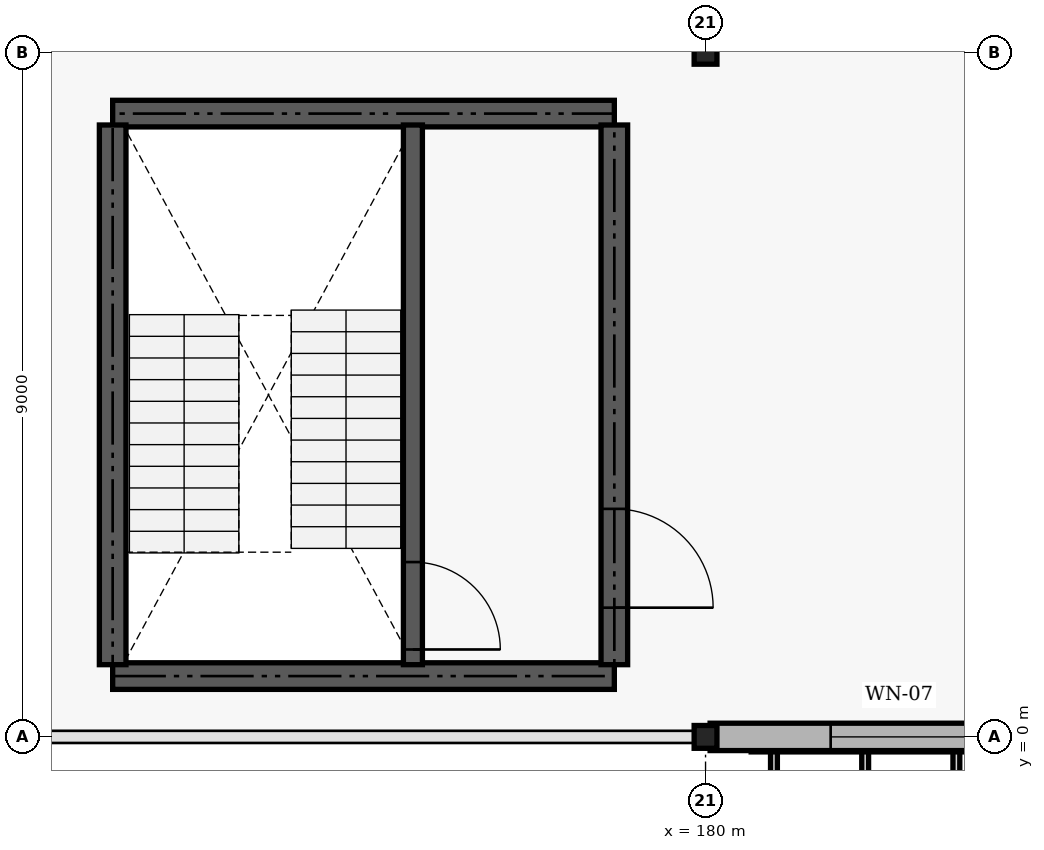
"""IFC4 building model, lengths in metres.
Left out: names, types, materials, properties, quantities, classifications, styles, units other than length and angle.
Written with IfcOpenShell. Run it as: python <this file> out.ifc"""

import sys

from ifc_helpers import new_model, si_unit, direction, frame, frame_2d, origin, origin_2d, place, context, subcontext, project, spatial, rectangle, i_section, extrude, element, fill, save


model = new_model("IFC4")
c1 = context("Model", 3, precision=1e-05, world=origin(), true_north=direction((0.0, 1.0)))
c2 = subcontext(c1, "Body", "Model", "MODEL_VIEW")
j1 = project(units=[si_unit("LENGTHUNIT", "METRE"), si_unit("PLANEANGLEUNIT", "RADIAN")], contexts=[c1])
p1 = place(None, origin())
s1 = spatial("IfcSite", under=j1, at=p1, CompositionType="ELEMENT")
p2 = place(p1, origin())
s2 = spatial("IfcBuilding", under=s1, at=p2, CompositionType="ELEMENT")
p3 = place(p2, frame((0.0, 0.0, 9.6)))
s3 = spatial("IfcBuildingStorey", under=s2, at=p3, CompositionType="ELEMENT", Elevation=9.6)
for number, where, z_axis, x_axis in (
    (1, (180.0, 0.0, 0.0), (0.0, 0.0, 1.0), (1.0, 0.0, 0.0)),
    (2, (180.0, 9.0, 0.0), (0.0, 0.0, 1.0), (1.0, 0.0, 0.0)),
):
    element("IfcColumn", number, at=place(p3, frame(where, z_axis=z_axis, x_axis=x_axis)), inside=s3, PredefinedType="COLUMN", context=c2, shape_type="SweptSolid", body=[
        extrude(i_section(OverallWidth=0.3, OverallDepth=0.3, WebThickness=0.011, FlangeThickness=0.019, FilletRadius=0.027, at=origin_2d()), origin(), (0.0, 0.0, 1.0), 3.9),
    ])
p4 = place(p3, frame((180.06, 0.0, 0.0), z_axis=(0.0, 0.0, 1.0), x_axis=(1.0, 0.0, 0.0)))
e3 = element("IfcWall", 3, at=p4, inside=s3, PredefinedType="SOLIDWALL", context=c2, shape_type="SweptSolid", body=[
    extrude(rectangle(XDim=8.88, YDim=0.36, at=frame_2d((4.44, 0.0))), origin(), (0.0, 0.0, 1.0), 3.25),
])
p5 = place(p4, frame((1.586, 0.0, 0.9)))
e4 = element("IfcOpeningElement", 4, at=p5, cuts=e3, PredefinedType="OPENING", context=c2, shape_type="SweptSolid", body=[
    extrude(rectangle(XDim=1.8, YDim=1.8, at=frame_2d((0.9, 0.9))), frame((0.0, 0.19, 0.0), z_axis=(0.0, -1.0, 0.0), x_axis=(1.0, 0.0, 0.0)), (0.0, 0.0, 1.0), 0.38),
])
p6 = place(p4, frame((5.494, 0.0, 0.9)))
e5 = element("IfcOpeningElement", 5, at=p6, cuts=e3, PredefinedType="OPENING", context=c2, shape_type="SweptSolid", body=[
    extrude(rectangle(XDim=1.8, YDim=1.8, at=frame_2d((0.9, 0.9))), frame((0.0, 0.19, 0.0), z_axis=(0.0, -1.0, 0.0), x_axis=(1.0, 0.0, 0.0)), (0.0, 0.0, 1.0), 0.38),
])
for number, where, z_axis, x_axis in (
    (6, (172.2, 0.8, 0.0), (0.0, 0.0, 1.0), (1.0, 0.0, 0.0)),
    (7, (172.2, 8.2, 0.0), (0.0, 0.0, 1.0), (1.0, 0.0, 0.0)),
):
    element("IfcWall", number, at=place(p3, frame(where, z_axis=z_axis, x_axis=x_axis)), inside=s3, PredefinedType="SHEAR", context=c2, shape_type="SweptSolid", body=[
        extrude(rectangle(XDim=6.6, YDim=0.35, at=frame_2d((3.3, 0.0))), origin(), (0.0, 0.0, 1.0), 3.9),
    ])
p7 = place(p3, frame((172.2, 0.95, 0.0), z_axis=(0.0, 0.0, 1.0), x_axis=(0.0, 1.0, 0.0)))
e8 = element("IfcWall", 8, at=p7, inside=s3, PredefinedType="SHEAR", context=c2, shape_type="SweptSolid", body=[
    extrude(rectangle(XDim=7.1, YDim=0.35, at=frame_2d((3.55, 0.0))), origin(), (0.0, 0.0, 1.0), 3.9),
])
p8 = place(p3, frame((178.8, 0.95, 0.0), z_axis=(0.0, 0.0, 1.0), x_axis=(0.0, 1.0, 0.0)))
e9 = element("IfcWall", 9, at=p8, inside=s3, PredefinedType="SHEAR", context=c2, shape_type="SweptSolid", body=[
    extrude(rectangle(XDim=7.1, YDim=0.35, at=frame_2d((3.55, 0.0))), origin(), (0.0, 0.0, 1.0), 3.9),
])
p9 = place(p8, frame((0.75, 0.0, 0.0)))
e10 = element("IfcOpeningElement", 10, at=p9, cuts=e9, PredefinedType="OPENING", context=c2, shape_type="SweptSolid", body=[
    extrude(rectangle(XDim=1.3, YDim=2.15, at=frame_2d((0.65, 1.075))), frame((0.0, 0.185, 0.0), z_axis=(0.0, -1.0, 0.0), x_axis=(1.0, 0.0, 0.0)), (0.0, 0.0, 1.0), 0.37),
])
p10 = place(p3, frame((176.15, 0.95, 0.0), z_axis=(0.0, 0.0, 1.0), x_axis=(0.0, 1.0, 0.0)))
e11 = element("IfcWall", 11, at=p10, inside=s3, PredefinedType="SHEAR", context=c2, shape_type="SweptSolid", body=[
    extrude(rectangle(XDim=7.1, YDim=0.25, at=frame_2d((3.55, 0.0))), origin(), (0.0, 0.0, 1.0), 3.9),
])
p11 = place(p10, frame((0.2, 0.0, 0.0)))
e12 = element("IfcOpeningElement", 12, at=p11, cuts=e11, PredefinedType="OPENING", context=c2, shape_type="SweptSolid", body=[
    extrude(rectangle(XDim=1.15, YDim=2.15, at=frame_2d((0.575, 1.075))), frame((0.0, 0.135, 0.0), z_axis=(0.0, -1.0, 0.0), x_axis=(1.0, 0.0, 0.0)), (0.0, 0.0, 1.0), 0.27),
])
p12 = place(p5, origin())
e13 = element("IfcWindow", 13, at=p12, inside=s3, PartitioningType="SINGLE_PANEL", PredefinedType="WINDOW", context=c2, shape_type="SweptSolid", body=[
    extrude(rectangle(XDim=1.8, YDim=1.8, at=frame_2d((0.9, 0.9))), frame((0.0, 0.03, 0.0), z_axis=(0.0, -1.0, 0.0), x_axis=(1.0, 0.0, 0.0)), (0.0, 0.0, 1.0), 0.06),
])
fill(e4, e13)
p13 = place(p9, frame((1.3, 0.0, 0.0), z_axis=(0.0, 0.0, 1.0), x_axis=(-1.0, 0.0, 0.0)))
e14 = element("IfcDoor", 14, at=p13, inside=s3, OperationType="DOUBLE_DOOR_SINGLE_SWING", PredefinedType="DOOR", context=c2, shape_type="SweptSolid", body=[
    extrude(rectangle(XDim=1.3, YDim=2.15, at=frame_2d((0.65, 1.075))), frame((0.0, 0.025, 0.0), z_axis=(0.0, -1.0, 0.0), x_axis=(1.0, 0.0, 0.0)), (0.0, 0.0, 1.0), 0.05),
])
fill(e10, e14)
p14 = place(p11, frame((1.15, 0.0, 0.0), z_axis=(0.0, 0.0, 1.0), x_axis=(-1.0, 0.0, 0.0)))
e15 = element("IfcDoor", 15, at=p14, inside=s3, OperationType="SINGLE_SWING_LEFT", PredefinedType="DOOR", context=c2, shape_type="SweptSolid", body=[
    extrude(rectangle(XDim=1.15, YDim=2.15, at=frame_2d((0.575, 1.075))), frame((0.0, 0.025, 0.0), z_axis=(0.0, -1.0, 0.0), x_axis=(1.0, 0.0, 0.0)), (0.0, 0.0, 1.0), 0.05),
])
fill(e12, e15)
save(model, sys.argv[1])
